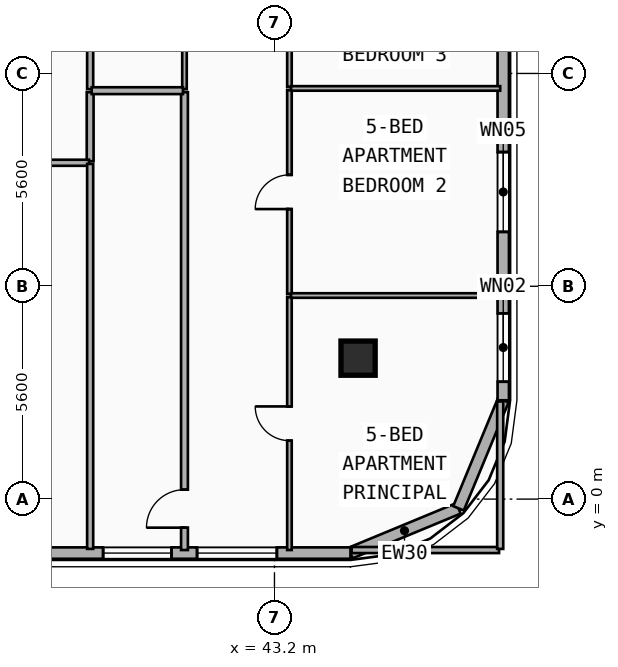
"""IFC4 building model, lengths in metres.
Left out: names, types, materials, properties, quantities, classifications, styles, units other than length and angle.
Written with IfcOpenShell. Run it as: python <this file> out.ifc"""

import sys

from ifc_helpers import new_model, si_unit, direction, frame, frame_2d, origin, origin_2d, place, context, subcontext, project, spatial, rectangle, extrude, element, fill, save


model = new_model("IFC4")
c1 = context("Model", 3, precision=1e-05, world=origin(), true_north=direction((0.0, 1.0)))
c2 = subcontext(c1, "Body", "Model", "MODEL_VIEW")
j1 = project(units=[si_unit("LENGTHUNIT", "METRE"), si_unit("PLANEANGLEUNIT", "RADIAN")], contexts=[c1])
p1 = place(None, origin())
s1 = spatial("IfcSite", under=j1, at=p1, CompositionType="ELEMENT")
p2 = place(p1, origin())
s2 = spatial("IfcBuilding", under=s1, at=p2, CompositionType="ELEMENT")
p3 = place(p2, frame((0.0, 0.0, 247.3)))
s3 = spatial("IfcBuildingStorey", under=s2, at=p3, CompositionType="ELEMENT", Elevation=247.3)
p4 = place(p3, frame((45.4, 3.818, 0.0), z_axis=(0.0, -0.090227632116, 0.995921168769), x_axis=(1.0, 0.0, 0.0)))
e1 = element("IfcColumn", 1, at=p4, inside=s3, PredefinedType="COLUMN", context=c2, shape_type="SweptSolid", body=[
    extrude(rectangle(XDim=0.9, YDim=0.9, at=origin_2d()), origin(), (0.0, 0.0, 1.0), 3.715),
])
p5 = place(p3, frame((48.042, -0.243, 0.0), z_axis=(0.0, 0.0, 1.0), x_axis=(-0.92389884758, -0.382636798336, 0.0)))
e2 = element("IfcWall", 2, at=p5, inside=s3, PredefinedType="SOLIDWALL", context=c2, shape_type="SweptSolid", body=[
    extrude(rectangle(XDim=3.077, YDim=0.3, at=frame_2d((1.538, 0.0))), origin(), (0.0, 0.0, 1.0), 3.42),
])
p6 = place(p3, frame((49.22, 2.6, 0.0), z_axis=(0.0, 0.0, 1.0), x_axis=(-0.382676475685, -0.923882414032, 0.0)))
e3 = element("IfcWall", 3, at=p6, inside=s3, PredefinedType="SOLIDWALL", context=c2, shape_type="SweptSolid", body=[
    extrude(rectangle(XDim=3.077, YDim=0.3, at=frame_2d((1.539, 0.0))), origin(), (0.0, 0.0, 1.0), 3.42),
])
p7 = place(p3, frame((49.22, 36.8, 0.0), z_axis=(0.0, 0.0, 1.0), x_axis=(0.0, -1.0, 0.0)))
e4 = element("IfcWall", 4, at=p7, inside=s3, PredefinedType="SOLIDWALL", context=c2, shape_type="SweptSolid", body=[
    extrude(rectangle(XDim=34.2, YDim=0.3, at=frame_2d((17.1, 0.0))), origin(), (0.0, 0.0, 1.0), 3.42),
])
p8 = place(p7, frame((31.912, 0.0, 0.8)))
e5 = element("IfcOpeningElement", 5, at=p8, cuts=e4, PredefinedType="OPENING", context=c2, shape_type="SweptSolid", body=[
    extrude(rectangle(XDim=1.8, YDim=1.8, at=frame_2d((0.9, 0.9))), frame((0.0, 0.16, 0.0), z_axis=(0.0, -1.0, 0.0), x_axis=(1.0, 0.0, 0.0)), (0.0, 0.0, 1.0), 0.32),
])
p9 = place(p7, frame((27.668, 0.0, 0.75)))
e6 = element("IfcOpeningElement", 6, at=p9, cuts=e4, PredefinedType="OPENING", context=c2, shape_type="SweptSolid", body=[
    extrude(rectangle(XDim=2.1, YDim=2.1, at=frame_2d((1.05, 1.05))), frame((0.0, 0.16, 0.0), z_axis=(0.0, -1.0, 0.0), x_axis=(1.0, 0.0, 0.0)), (0.0, 0.0, 1.0), 0.32),
])
p10 = place(p7, frame((22.503, 0.0, 0.75)))
e7 = element("IfcOpeningElement", 7, at=p10, cuts=e4, PredefinedType="OPENING", context=c2, shape_type="SweptSolid", body=[
    extrude(rectangle(XDim=2.1, YDim=2.1, at=frame_2d((1.05, 1.05))), frame((0.0, 0.16, 0.0), z_axis=(0.0, -1.0, 0.0), x_axis=(1.0, 0.0, 0.0)), (0.0, 0.0, 1.0), 0.32),
])
p11 = place(p7, frame((17.623, 0.0, 0.75)))
e8 = element("IfcOpeningElement", 8, at=p11, cuts=e4, PredefinedType="OPENING", context=c2, shape_type="SweptSolid", body=[
    extrude(rectangle(XDim=2.1, YDim=2.1, at=frame_2d((1.05, 1.05))), frame((0.0, 0.16, 0.0), z_axis=(0.0, -1.0, 0.0), x_axis=(1.0, 0.0, 0.0)), (0.0, 0.0, 1.0), 0.32),
])
p12 = place(p7, frame((13.832, 0.0, 0.75)))
e9 = element("IfcOpeningElement", 9, at=p12, cuts=e4, PredefinedType="OPENING", context=c2, shape_type="SweptSolid", body=[
    extrude(rectangle(XDim=2.1, YDim=2.1, at=frame_2d((1.05, 1.05))), frame((0.0, 0.16, 0.0), z_axis=(0.0, -1.0, 0.0), x_axis=(1.0, 0.0, 0.0)), (0.0, 0.0, 1.0), 0.32),
])
p13 = place(p3, frame((45.2, -1.42, 0.0), z_axis=(0.0, 0.0, 1.0), x_axis=(-1.0, 0.0, 0.0)))
e10 = element("IfcWall", 10, at=p13, inside=s3, PredefinedType="SOLIDWALL", context=c2, shape_type="SweptSolid", body=[
    extrude(rectangle(XDim=32.8, YDim=0.3, at=frame_2d((16.4, 0.0))), origin(), (0.0, 0.0, 1.0), 3.42),
])
p14 = place(p13, frame((29.071, 0.0, 0.75)))
e11 = element("IfcOpeningElement", 11, at=p14, cuts=e10, PredefinedType="OPENING", context=c2, shape_type="SweptSolid", body=[
    extrude(rectangle(XDim=2.1, YDim=2.1, at=frame_2d((1.05, 1.05))), frame((0.0, 0.16, 0.0), z_axis=(0.0, -1.0, 0.0), x_axis=(1.0, 0.0, 0.0)), (0.0, 0.0, 1.0), 0.32),
])
p15 = place(p13, frame((26.745, 0.0, 0.75)))
e12 = element("IfcOpeningElement", 12, at=p15, cuts=e10, PredefinedType="OPENING", context=c2, shape_type="SweptSolid", body=[
    extrude(rectangle(XDim=1.6, YDim=1.95, at=frame_2d((0.8, 0.975))), frame((0.0, 0.16, 0.0), z_axis=(0.0, -1.0, 0.0), x_axis=(1.0, 0.0, 0.0)), (0.0, 0.0, 1.0), 0.32),
])
p16 = place(p13, frame((21.981, 0.0, 0.75)))
e13 = element("IfcOpeningElement", 13, at=p16, cuts=e10, PredefinedType="OPENING", context=c2, shape_type="SweptSolid", body=[
    extrude(rectangle(XDim=2.1, YDim=2.1, at=frame_2d((1.05, 1.05))), frame((0.0, 0.16, 0.0), z_axis=(0.0, -1.0, 0.0), x_axis=(1.0, 0.0, 0.0)), (0.0, 0.0, 1.0), 0.32),
])
p17 = place(p13, frame((18.324, 0.0, 0.75)))
e14 = element("IfcOpeningElement", 14, at=p17, cuts=e10, PredefinedType="OPENING", context=c2, shape_type="SweptSolid", body=[
    extrude(rectangle(XDim=2.1, YDim=2.1, at=frame_2d((1.05, 1.05))), frame((0.0, 0.16, 0.0), z_axis=(0.0, -1.0, 0.0), x_axis=(1.0, 0.0, 0.0)), (0.0, 0.0, 1.0), 0.32),
])
p18 = place(p13, frame((11.364, 0.0, 0.75)))
e15 = element("IfcOpeningElement", 15, at=p18, cuts=e10, PredefinedType="OPENING", context=c2, shape_type="SweptSolid", body=[
    extrude(rectangle(XDim=2.1, YDim=2.1, at=frame_2d((1.05, 1.05))), frame((0.0, 0.16, 0.0), z_axis=(0.0, -1.0, 0.0), x_axis=(1.0, 0.0, 0.0)), (0.0, 0.0, 1.0), 0.32),
])
p19 = place(p13, frame((9.238, 0.0, 0.68)))
e16 = element("IfcOpeningElement", 16, at=p19, cuts=e10, PredefinedType="OPENING", context=c2, shape_type="SweptSolid", body=[
    extrude(rectangle(XDim=1.2, YDim=1.5, at=frame_2d((0.6, 0.75))), frame((0.0, 0.16, 0.0), z_axis=(0.0, -1.0, 0.0), x_axis=(1.0, 0.0, 0.0)), (0.0, 0.0, 1.0), 0.32),
])
p20 = place(p13, frame((14.669, 0.0, 0.75)))
e17 = element("IfcOpeningElement", 17, at=p20, cuts=e10, PredefinedType="OPENING", context=c2, shape_type="SweptSolid", body=[
    extrude(rectangle(XDim=2.1, YDim=2.1, at=frame_2d((1.05, 1.05))), frame((0.0, 0.16, 0.0), z_axis=(0.0, -1.0, 0.0), x_axis=(1.0, 0.0, 0.0)), (0.0, 0.0, 1.0), 0.32),
])
p21 = place(p13, frame((1.937, 0.0, 0.75)))
e18 = element("IfcOpeningElement", 18, at=p21, cuts=e10, PredefinedType="OPENING", context=c2, shape_type="SweptSolid", body=[
    extrude(rectangle(XDim=2.1, YDim=2.1, at=frame_2d((1.05, 1.05))), frame((0.0, 0.16, 0.0), z_axis=(0.0, -1.0, 0.0), x_axis=(1.0, 0.0, 0.0)), (0.0, 0.0, 1.0), 0.32),
])
p22 = place(p13, frame((4.709, 0.0, 0.8)))
e19 = element("IfcOpeningElement", 19, at=p22, cuts=e10, PredefinedType="OPENING", context=c2, shape_type="SweptSolid", body=[
    extrude(rectangle(XDim=1.8, YDim=1.8, at=frame_2d((0.9, 0.9))), frame((0.0, 0.16, 0.0), z_axis=(0.0, -1.0, 0.0), x_axis=(1.0, 0.0, 0.0)), (0.0, 0.0, 1.0), 0.32),
])
p23 = place(p3, frame((38.35, 8.89, 0.0), z_axis=(0.0, 0.0, 1.0), x_axis=(0.0, 1.0, 0.0)))
e20 = element("IfcWall", 20, at=p23, inside=s3, PredefinedType="PLUMBINGWALL", context=c2, shape_type="SweptSolid", body=[
    extrude(rectangle(XDim=1.817, YDim=0.18, at=frame_2d((0.909, 0.0))), origin(), (0.0, 0.0, 1.0), 3.42),
])
p24 = place(p3, frame((38.35, 10.787, 0.0), z_axis=(0.0, 0.0, 1.0), x_axis=(0.0, 1.0, 0.0)))
e21 = element("IfcWall", 21, at=p24, inside=s3, PredefinedType="PARTITIONING", context=c2, shape_type="SweptSolid", body=[
    extrude(rectangle(XDim=7.975, YDim=0.16, at=frame_2d((3.987, 0.0))), origin(), (0.0, 0.0, 1.0), 2.9),
])
p25 = place(p3, frame((40.832, -1.34, 0.0), z_axis=(0.0, 0.0, 1.0), x_axis=(0.0, 1.0, 0.0)))
e22 = element("IfcWall", 22, at=p25, inside=s3, PredefinedType="PLUMBINGWALL", context=c2, shape_type="SweptSolid", body=[
    extrude(rectangle(XDim=12.047, YDim=0.18, at=frame_2d((6.023, 0.0))), origin(), (0.0, 0.0, 1.0), 3.05),
])
p26 = place(p25, frame((0.589, 0.0, 0.0)))
e23 = element("IfcOpeningElement", 23, at=p26, cuts=e22, PredefinedType="OPENING", context=c2, shape_type="SweptSolid", body=[
    extrude(rectangle(XDim=1.0, YDim=2.15, at=frame_2d((0.5, 1.075))), frame((0.0, 0.1, 0.0), z_axis=(0.0, -1.0, 0.0), x_axis=(1.0, 0.0, 0.0)), (0.0, 0.0, 1.0), 0.2),
])
p27 = place(p3, frame((40.832, 10.787, 0.0), z_axis=(0.0, 0.0, 1.0), x_axis=(0.0, 1.0, 0.0)))
e24 = element("IfcWall", 24, at=p27, inside=s3, PredefinedType="PARTITIONING", context=c2, shape_type="SweptSolid", body=[
    extrude(rectangle(XDim=7.975, YDim=0.12, at=frame_2d((3.987, 0.0))), origin(), (0.0, 0.0, 1.0), 2.9),
])
p28 = place(p27, frame((3.538, 0.0, 0.0)))
e25 = element("IfcOpeningElement", 25, at=p28, cuts=e24, PredefinedType="OPENING", context=c2, shape_type="SweptSolid", body=[
    extrude(rectangle(XDim=0.9, YDim=2.1, at=frame_2d((0.45, 1.05))), frame((0.0, 0.07, 0.0), z_axis=(0.0, -1.0, 0.0), x_axis=(1.0, 0.0, 0.0)), (0.0, 0.0, 1.0), 0.14),
])
p29 = place(p3, frame((43.594, -1.34, 0.0), z_axis=(0.0, 0.0, 1.0), x_axis=(0.0, 1.0, 0.0)))
e26 = element("IfcWall", 26, at=p29, inside=s3, PredefinedType="PARTITIONING", context=c2, shape_type="SweptSolid", body=[
    extrude(rectangle(XDim=6.657, YDim=0.12, at=frame_2d((3.329, 0.0))), origin(), (0.0, 0.0, 1.0), 3.08),
])
p30 = place(p29, frame((2.878, 0.0, 0.0)))
e27 = element("IfcOpeningElement", 27, at=p30, cuts=e26, PredefinedType="OPENING", context=c2, shape_type="SweptSolid", body=[
    extrude(rectangle(XDim=0.9, YDim=2.1, at=frame_2d((0.45, 1.05))), frame((0.0, 0.07, 0.0), z_axis=(0.0, -1.0, 0.0), x_axis=(1.0, 0.0, 0.0)), (0.0, 0.0, 1.0), 0.14),
])
p31 = place(p3, frame((43.594, 5.397, 0.0), z_axis=(0.0, 0.0, 1.0), x_axis=(0.0, 1.0, 0.0)))
e28 = element("IfcWall", 28, at=p31, inside=s3, PredefinedType="PARTITIONING", context=c2, shape_type="SweptSolid", body=[
    extrude(rectangle(XDim=5.369, YDim=0.12, at=frame_2d((2.685, 0.0))), origin(), (0.0, 0.0, 1.0), 3.05),
])
p32 = place(p31, frame((2.235, 0.0, 0.0)))
e29 = element("IfcOpeningElement", 29, at=p32, cuts=e28, PredefinedType="OPENING", context=c2, shape_type="SweptSolid", body=[
    extrude(rectangle(XDim=0.9, YDim=2.1, at=frame_2d((0.45, 1.05))), frame((0.0, 0.07, 0.0), z_axis=(0.0, -1.0, 0.0), x_axis=(1.0, 0.0, 0.0)), (0.0, 0.0, 1.0), 0.14),
])
p33 = place(p3, frame((43.594, 10.846, 0.0), z_axis=(0.0, 0.0, 1.0), x_axis=(0.0, 1.0, 0.0)))
e30 = element("IfcWall", 30, at=p33, inside=s3, PredefinedType="PARTITIONING", context=c2, shape_type="SweptSolid", body=[
    extrude(rectangle(XDim=4.801, YDim=0.12, at=frame_2d((2.4, 0.0))), origin(), (0.0, 0.0, 1.0), 2.9),
])
p34 = place(p33, frame((1.95, 0.0, 0.0)))
e31 = element("IfcOpeningElement", 31, at=p34, cuts=e30, PredefinedType="OPENING", context=c2, shape_type="SweptSolid", body=[
    extrude(rectangle(XDim=0.9, YDim=2.1, at=frame_2d((0.45, 1.05))), frame((0.0, 0.07, 0.0), z_axis=(0.0, -1.0, 0.0), x_axis=(1.0, 0.0, 0.0)), (0.0, 0.0, 1.0), 0.14),
])
p35 = place(p3, frame((38.39, 10.747, 0.0), z_axis=(0.0, 0.0, 1.0), x_axis=(1.0, 0.0, 0.0)))
e32 = element("IfcWall", 32, at=p35, inside=s3, PredefinedType="PLUMBINGWALL", context=c2, shape_type="SweptSolid", body=[
    extrude(rectangle(XDim=2.402, YDim=0.18, at=frame_2d((1.201, 0.0))), origin(), (0.0, 0.0, 1.0), 3.42),
])
for number, where, z_axis, x_axis in (
    (33, (43.634, 5.357, 0.0), (0.0, 0.0, 1.0), (1.0, 0.0, 0.0)),
    (34, (43.634, 10.806, 0.0), (0.0, 0.0, 1.0), (1.0, 0.0, 0.0)),
):
    element("IfcWall", number, at=place(p3, frame(where, z_axis=z_axis, x_axis=x_axis)), inside=s3, PredefinedType="PARTITIONING", context=c2, shape_type="SweptSolid", body=[
        extrude(rectangle(XDim=5.506, YDim=0.12, at=frame_2d((2.753, 0.0))), origin(), (0.0, 0.0, 1.0), 2.7),
    ])
p36 = place(p3, frame((36.38, 8.85, 0.0), z_axis=(0.0, 0.0, 1.0), x_axis=(1.0, 0.0, 0.0)))
e35 = element("IfcWall", 35, at=p36, inside=s3, PredefinedType="PARTITIONING", context=c2, shape_type="SweptSolid", body=[
    extrude(rectangle(XDim=1.94, YDim=0.16, at=frame_2d((0.97, 0.0))), origin(), (0.0, 0.0, 1.0), 2.7),
])
p37 = place(p3, frame((38.35, -1.31, 0.0), z_axis=(0.0, 0.0, 1.0), x_axis=(0.0, 1.0, 0.0)))
e36 = element("IfcWall", 36, at=p37, inside=s3, PredefinedType="PARTITIONING", context=c2, shape_type="SweptSolid", body=[
    extrude(rectangle(XDim=10.13, YDim=0.16, at=frame_2d((5.065, 0.0))), origin(), (0.0, 0.0, 1.0), 3.05),
])
for number, where, z_axis, x_axis in (
    (37, (45.23, -1.34, 0.0), (0.0, 0.0, 1.0), (1.0, 0.0, 0.0)),
    (38, (49.14, -1.31, 0.0), (0.0, 0.0, 1.0), (0.0, 1.0, 0.0)),
):
    element("IfcWall", number, at=place(p3, frame(where, z_axis=z_axis, x_axis=x_axis)), inside=s3, PredefinedType="PARTITIONING", context=c2, shape_type="SweptSolid", body=[
        extrude(rectangle(XDim=3.88, YDim=0.16, at=frame_2d((1.94, 0.0))), origin(), (0.0, 0.0, 1.0), 3.42),
    ])
p38 = place(p8, origin())
e39 = element("IfcWindow", 39, at=p38, inside=s3, PartitioningType="SINGLE_PANEL", PredefinedType="WINDOW", context=c2, shape_type="SweptSolid", body=[
    extrude(rectangle(XDim=1.8, YDim=1.8, at=frame_2d((0.9, 0.9))), frame((0.0, 0.03, 0.0), z_axis=(0.0, -1.0, 0.0), x_axis=(1.0, 0.0, 0.0)), (0.0, 0.0, 1.0), 0.06),
])
fill(e5, e39)
p39 = place(p9, origin())
e40 = element("IfcWindow", 40, at=p39, inside=s3, PartitioningType="SINGLE_PANEL", PredefinedType="WINDOW", context=c2, shape_type="SweptSolid", body=[
    extrude(rectangle(XDim=2.1, YDim=2.1, at=frame_2d((1.05, 1.05))), frame((0.0, 0.03, 0.0), z_axis=(0.0, -1.0, 0.0), x_axis=(1.0, 0.0, 0.0)), (0.0, 0.0, 1.0), 0.06),
])
fill(e6, e40)
p40 = place(p21, origin())
e41 = element("IfcWindow", 41, at=p40, inside=s3, PartitioningType="SINGLE_PANEL", PredefinedType="WINDOW", context=c2, shape_type="SweptSolid", body=[
    extrude(rectangle(XDim=2.1, YDim=2.1, at=frame_2d((1.05, 1.05))), frame((0.0, 0.03, 0.0), z_axis=(0.0, -1.0, 0.0), x_axis=(1.0, 0.0, 0.0)), (0.0, 0.0, 1.0), 0.06),
])
fill(e18, e41)
p41 = place(p22, origin())
e42 = element("IfcWindow", 42, at=p41, inside=s3, PartitioningType="SINGLE_PANEL", PredefinedType="WINDOW", context=c2, shape_type="SweptSolid", body=[
    extrude(rectangle(XDim=1.8, YDim=1.8, at=frame_2d((0.9, 0.9))), frame((0.0, 0.03, 0.0), z_axis=(0.0, -1.0, 0.0), x_axis=(1.0, 0.0, 0.0)), (0.0, 0.0, 1.0), 0.06),
])
fill(e19, e42)
p42 = place(p26, origin())
e43 = element("IfcDoor", 43, at=p42, inside=s3, OperationType="SINGLE_SWING_LEFT", PredefinedType="DOOR", context=c2, shape_type="SweptSolid", body=[
    extrude(rectangle(XDim=1.0, YDim=2.15, at=frame_2d((0.5, 1.075))), frame((0.0, 0.025, 0.0), z_axis=(0.0, -1.0, 0.0), x_axis=(1.0, 0.0, 0.0)), (0.0, 0.0, 1.0), 0.05),
])
fill(e23, e43)
p43 = place(p30, origin())
e44 = element("IfcDoor", 44, at=p43, inside=s3, OperationType="SINGLE_SWING_RIGHT", PredefinedType="DOOR", context=c2, shape_type="SweptSolid", body=[
    extrude(rectangle(XDim=0.9, YDim=2.1, at=frame_2d((0.45, 1.05))), frame((0.0, 0.025, 0.0), z_axis=(0.0, -1.0, 0.0), x_axis=(1.0, 0.0, 0.0)), (0.0, 0.0, 1.0), 0.05),
])
fill(e27, e44)
p44 = place(p32, origin())
e45 = element("IfcDoor", 45, at=p44, inside=s3, OperationType="SINGLE_SWING_LEFT", PredefinedType="DOOR", context=c2, shape_type="SweptSolid", body=[
    extrude(rectangle(XDim=0.9, YDim=2.1, at=frame_2d((0.45, 1.05))), frame((0.0, 0.025, 0.0), z_axis=(0.0, -1.0, 0.0), x_axis=(1.0, 0.0, 0.0)), (0.0, 0.0, 1.0), 0.05),
])
fill(e29, e45)
save(model, sys.argv[1])
